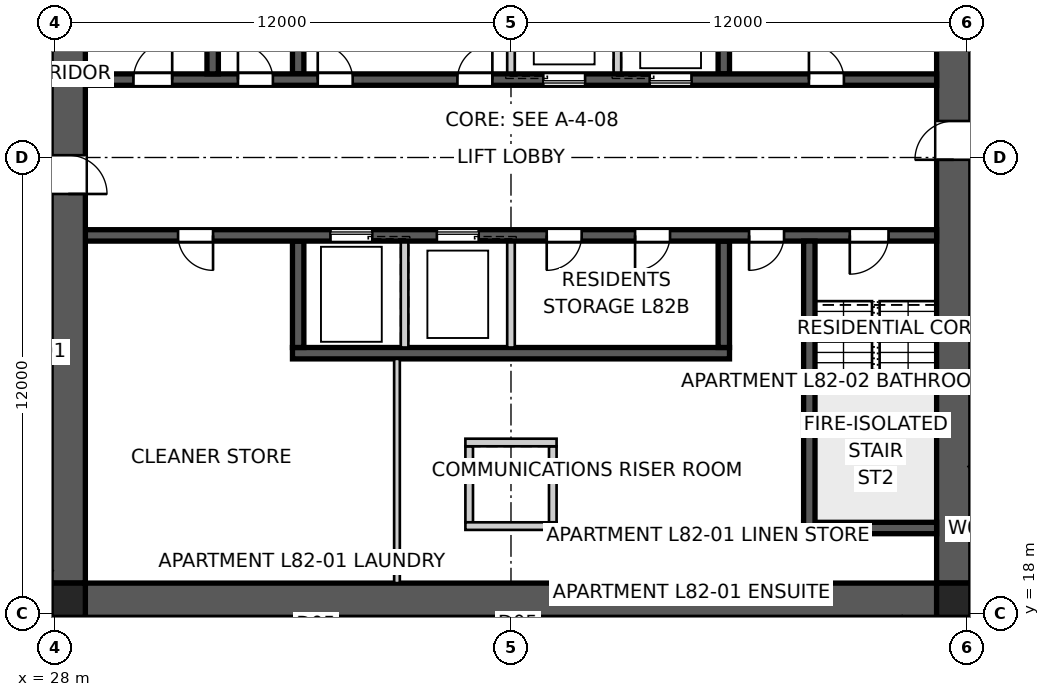
"""IFC4 building model, lengths in metres.
Left out: names, types, materials, properties, quantities, classifications, styles, units other than length and angle.
Written with IfcOpenShell. Run it as: python <this file> out.ifc"""

import sys

from ifc_helpers import new_model, si_unit, direction, frame, frame_2d, origin, origin_2d, place, context, subcontext, project, spatial, polyline, rectangle, outline, extrude, element, fill, save


model = new_model("IFC4")
c1 = context("Model", 3, precision=1e-05, world=origin(), true_north=direction((0.0, 1.0)))
c2 = subcontext(c1, "Body", "Model", "MODEL_VIEW")
j1 = project(units=[si_unit("LENGTHUNIT", "METRE"), si_unit("PLANEANGLEUNIT", "RADIAN")], contexts=[c1])
p1 = place(None, origin())
s1 = spatial("IfcSite", under=j1, at=p1, CompositionType="ELEMENT")
p2 = place(p1, origin())
s2 = spatial("IfcBuilding", under=s1, at=p2, CompositionType="ELEMENT")
p3 = place(p2, frame((0.0, 0.0, 296.4)))
s3 = spatial("IfcBuildingStorey", under=s2, at=p3, CompositionType="ELEMENT", Elevation=296.4)
p4 = place(p3, frame((51.2, 18.35, 0.0), z_axis=(0.0, 0.0, 1.0), x_axis=(-1.0, 0.0, 0.0)))
e1 = element("IfcWall", 1, at=p4, inside=s3, PredefinedType="SHEAR", context=c2, shape_type="SweptSolid", body=[
    extrude(outline(polyline([(0.0, -0.45), (22.4, -0.45), (22.4, -0.025), (22.85, -0.025), (22.85, 0.025), (22.4, 0.025), (22.4, 0.45), (0.0, 0.45), (0.0, 0.025), (-0.45, 0.025), (-0.45, -0.025), (0.0, -0.025), (0.0, -0.45)])), origin(), (0.0, 0.0, 1.0), 3.4),
])
p5 = place(p3, frame((51.65, 18.8, 0.0), z_axis=(0.0, 0.0, 1.0), x_axis=(0.0, 1.0, 0.0)))
e2 = element("IfcWall", 2, at=p5, inside=s3, PredefinedType="SHEAR", context=c2, shape_type="SweptSolid", body=[
    extrude(outline(polyline([(0.0, -0.45), (22.4, -0.45), (22.4, -0.025), (22.85, -0.025), (22.85, 0.025), (22.4, 0.025), (22.4, 0.45), (0.0, 0.45), (0.0, 0.025), (-0.45, 0.025), (-0.45, -0.025), (0.0, -0.025), (0.0, -0.45)])), origin(), (0.0, 0.0, 1.0), 3.4),
])
p6 = place(p5, frame((11.14, 0.0, 0.0)))
e3 = element("IfcOpeningElement", 3, at=p6, cuts=e2, PredefinedType="OPENING", context=c2, shape_type="SweptSolid", body=[
    extrude(rectangle(XDim=1.02, YDim=2.4, at=frame_2d((0.51, 1.2))), frame((0.0, 0.46, 0.0), z_axis=(0.0, -1.0, 0.0), x_axis=(1.0, 0.0, 0.0)), (0.0, 0.0, 1.0), 0.92),
])
p7 = place(p3, frame((28.35, 41.2, 0.0), z_axis=(0.0, 0.0, 1.0), x_axis=(0.0, -1.0, 0.0)))
e4 = element("IfcWall", 4, at=p7, inside=s3, PredefinedType="SHEAR", context=c2, shape_type="SweptSolid", body=[
    extrude(outline(polyline([(0.0, -0.45), (22.4, -0.45), (22.4, -0.025), (22.85, -0.025), (22.85, 0.025), (22.4, 0.025), (22.4, 0.45), (0.0, 0.45), (0.0, 0.025), (-0.45, 0.025), (-0.45, -0.025), (0.0, -0.025), (0.0, -0.45)])), origin(), (0.0, 0.0, 1.0), 3.4),
])
p8 = place(p7, frame((11.14, 0.0, 0.0)))
e5 = element("IfcOpeningElement", 5, at=p8, cuts=e4, PredefinedType="OPENING", context=c2, shape_type="SweptSolid", body=[
    extrude(rectangle(XDim=1.02, YDim=2.4, at=frame_2d((0.51, 1.2))), frame((0.0, 0.46, 0.0), z_axis=(0.0, -1.0, 0.0), x_axis=(1.0, 0.0, 0.0)), (0.0, 0.0, 1.0), 0.92),
])
p9 = place(p3, frame((28.8, 32.05, 0.0), z_axis=(0.0, 0.0, 1.0), x_axis=(1.0, 0.0, 0.0)))
e6 = element("IfcWall", 6, at=p9, inside=s3, PredefinedType="SHEAR", context=c2, shape_type="SweptSolid", body=[
    extrude(rectangle(XDim=22.4, YDim=0.3, at=frame_2d((11.2, 0.0))), origin(), (0.0, 0.0, 1.0), 3.4),
])
p10 = place(p9, frame((19.04, 0.0, 0.0)))
e7 = element("IfcOpeningElement", 7, at=p10, cuts=e6, PredefinedType="OPENING", context=c2, shape_type="SweptSolid", body=[
    extrude(rectangle(XDim=0.92, YDim=2.1, at=frame_2d((0.46, 1.05))), frame((0.0, 0.16, 0.0), z_axis=(0.0, -1.0, 0.0), x_axis=(1.0, 0.0, 0.0)), (0.0, 0.0, 1.0), 0.32),
])
p11 = place(p9, frame((1.265, 0.0, 0.0)))
e8 = element("IfcOpeningElement", 8, at=p11, cuts=e6, PredefinedType="OPENING", context=c2, shape_type="SweptSolid", body=[
    extrude(rectangle(XDim=1.02, YDim=2.1, at=frame_2d((0.51, 1.05))), frame((0.0, 0.16, 0.0), z_axis=(0.0, -1.0, 0.0), x_axis=(1.0, 0.0, 0.0)), (0.0, 0.0, 1.0), 0.32),
])
p12 = place(p9, frame((4.015, 0.0, 0.0)))
e9 = element("IfcOpeningElement", 9, at=p12, cuts=e6, PredefinedType="OPENING", context=c2, shape_type="SweptSolid", body=[
    extrude(rectangle(XDim=0.92, YDim=2.1, at=frame_2d((0.46, 1.05))), frame((0.0, 0.16, 0.0), z_axis=(0.0, -1.0, 0.0), x_axis=(1.0, 0.0, 0.0)), (0.0, 0.0, 1.0), 0.32),
])
p13 = place(p9, frame((6.115, 0.0, 0.0)))
e10 = element("IfcOpeningElement", 10, at=p13, cuts=e6, PredefinedType="OPENING", context=c2, shape_type="SweptSolid", body=[
    extrude(rectangle(XDim=0.92, YDim=2.1, at=frame_2d((0.46, 1.05))), frame((0.0, 0.16, 0.0), z_axis=(0.0, -1.0, 0.0), x_axis=(1.0, 0.0, 0.0)), (0.0, 0.0, 1.0), 0.32),
])
p14 = place(p9, frame((9.79, 0.0, 0.0)))
e11 = element("IfcOpeningElement", 11, at=p14, cuts=e6, PredefinedType="OPENING", context=c2, shape_type="SweptSolid", body=[
    extrude(rectangle(XDim=0.92, YDim=2.1, at=frame_2d((0.46, 1.05))), frame((0.0, 0.16, 0.0), z_axis=(0.0, -1.0, 0.0), x_axis=(1.0, 0.0, 0.0)), (0.0, 0.0, 1.0), 0.32),
])
p15 = place(p9, frame((12.05, 0.0, 0.0)))
e12 = element("IfcOpeningElement", 12, at=p15, cuts=e6, PredefinedType="OPENING", context=c2, shape_type="SweptSolid", body=[
    extrude(rectangle(XDim=1.1, YDim=2.1, at=frame_2d((0.55, 1.05))), frame((0.0, 0.16, 0.0), z_axis=(0.0, -1.0, 0.0), x_axis=(1.0, 0.0, 0.0)), (0.0, 0.0, 1.0), 0.32),
])
p16 = place(p9, frame((14.85, 0.0, 0.0)))
e13 = element("IfcOpeningElement", 13, at=p16, cuts=e6, PredefinedType="OPENING", context=c2, shape_type="SweptSolid", body=[
    extrude(rectangle(XDim=1.1, YDim=2.1, at=frame_2d((0.55, 1.05))), frame((0.0, 0.16, 0.0), z_axis=(0.0, -1.0, 0.0), x_axis=(1.0, 0.0, 0.0)), (0.0, 0.0, 1.0), 0.32),
])
p17 = place(p3, frame((51.2, 27.95, 0.0), z_axis=(0.0, 0.0, 1.0), x_axis=(-1.0, 0.0, 0.0)))
e14 = element("IfcWall", 14, at=p17, inside=s3, PredefinedType="SHEAR", context=c2, shape_type="SweptSolid", body=[
    extrude(rectangle(XDim=22.4, YDim=0.3, at=frame_2d((11.2, 0.0))), origin(), (0.0, 0.0, 1.0), 3.4),
])
p18 = place(p17, frame((19.04, 0.0, 0.0)))
e15 = element("IfcOpeningElement", 15, at=p18, cuts=e14, PredefinedType="OPENING", context=c2, shape_type="SweptSolid", body=[
    extrude(rectangle(XDim=0.92, YDim=2.1, at=frame_2d((0.46, 1.05))), frame((0.0, 0.16, 0.0), z_axis=(0.0, -1.0, 0.0), x_axis=(1.0, 0.0, 0.0)), (0.0, 0.0, 1.0), 0.32),
])
p19 = place(p17, frame((1.265, 0.0, 0.0)))
e16 = element("IfcOpeningElement", 16, at=p19, cuts=e14, PredefinedType="OPENING", context=c2, shape_type="SweptSolid", body=[
    extrude(rectangle(XDim=1.02, YDim=2.1, at=frame_2d((0.51, 1.05))), frame((0.0, 0.16, 0.0), z_axis=(0.0, -1.0, 0.0), x_axis=(1.0, 0.0, 0.0)), (0.0, 0.0, 1.0), 0.32),
])
p20 = place(p17, frame((4.015, 0.0, 0.0)))
e17 = element("IfcOpeningElement", 17, at=p20, cuts=e14, PredefinedType="OPENING", context=c2, shape_type="SweptSolid", body=[
    extrude(rectangle(XDim=0.92, YDim=2.1, at=frame_2d((0.46, 1.05))), frame((0.0, 0.16, 0.0), z_axis=(0.0, -1.0, 0.0), x_axis=(1.0, 0.0, 0.0)), (0.0, 0.0, 1.0), 0.32),
])
p21 = place(p17, frame((9.34, 0.0, 0.0)))
e18 = element("IfcOpeningElement", 18, at=p21, cuts=e14, PredefinedType="OPENING", context=c2, shape_type="SweptSolid", body=[
    extrude(rectangle(XDim=0.92, YDim=2.1, at=frame_2d((0.46, 1.05))), frame((0.0, 0.16, 0.0), z_axis=(0.0, -1.0, 0.0), x_axis=(1.0, 0.0, 0.0)), (0.0, 0.0, 1.0), 0.32),
])
p22 = place(p17, frame((7.015, 0.0, 0.0)))
e19 = element("IfcOpeningElement", 19, at=p22, cuts=e14, PredefinedType="OPENING", context=c2, shape_type="SweptSolid", body=[
    extrude(rectangle(XDim=0.92, YDim=2.1, at=frame_2d((0.46, 1.05))), frame((0.0, 0.16, 0.0), z_axis=(0.0, -1.0, 0.0), x_axis=(1.0, 0.0, 0.0)), (0.0, 0.0, 1.0), 0.32),
])
p23 = place(p17, frame((12.05, 0.0, 0.0)))
e20 = element("IfcOpeningElement", 20, at=p23, cuts=e14, PredefinedType="OPENING", context=c2, shape_type="SweptSolid", body=[
    extrude(rectangle(XDim=1.1, YDim=2.1, at=frame_2d((0.55, 1.05))), frame((0.0, 0.16, 0.0), z_axis=(0.0, -1.0, 0.0), x_axis=(1.0, 0.0, 0.0)), (0.0, 0.0, 1.0), 0.32),
])
p24 = place(p17, frame((14.85, 0.0, 0.0)))
e21 = element("IfcOpeningElement", 21, at=p24, cuts=e14, PredefinedType="OPENING", context=c2, shape_type="SweptSolid", body=[
    extrude(rectangle(XDim=1.1, YDim=2.1, at=frame_2d((0.55, 1.05))), frame((0.0, 0.16, 0.0), z_axis=(0.0, -1.0, 0.0), x_axis=(1.0, 0.0, 0.0)), (0.0, 0.0, 1.0), 0.32),
])
p25 = place(p3, frame((45.75, 24.85, 0.0), z_axis=(0.0, 0.0, 1.0), x_axis=(-1.0, 0.0, 0.0)))
e22 = element("IfcWall", 22, at=p25, inside=s3, PredefinedType="SHEAR", context=c2, shape_type="SweptSolid", body=[
    extrude(rectangle(XDim=11.5, YDim=0.3, at=frame_2d((5.75, 0.0))), origin(), (0.0, 0.0, 1.0), 3.4),
])
for number, where, z_axis, x_axis in (
    (23, (34.4, 32.2, 0.0), (0.0, 0.0, 1.0), (0.0, 1.0, 0.0)),
    (24, (45.6, 27.8, 0.0), (0.0, 0.0, 1.0), (0.0, -1.0, 0.0)),
):
    element("IfcWall", number, at=place(p3, frame(where, z_axis=z_axis, x_axis=x_axis)), inside=s3, PredefinedType="SHEAR", context=c2, shape_type="SweptSolid", body=[
        extrude(rectangle(XDim=2.8, YDim=0.3, at=frame_2d((1.4, 0.0))), origin(), (0.0, 0.0, 1.0), 3.4),
    ])
for number, where, z_axis, x_axis in (
    (25, (40.0, 32.2, 0.0), (0.0, 0.0, 1.0), (0.0, 1.0, 0.0)),
    (26, (40.0, 27.8, 0.0), (0.0, 0.0, 1.0), (0.0, -1.0, 0.0)),
    (27, (42.8, 32.2, 0.0), (0.0, 0.0, 1.0), (0.0, 1.0, 0.0)),
    (28, (37.2, 27.8, 0.0), (0.0, 0.0, 1.0), (0.0, -1.0, 0.0)),
):
    element("IfcWall", number, at=place(p3, frame(where, z_axis=z_axis, x_axis=x_axis)), inside=s3, PredefinedType="SOLIDWALL", context=c2, shape_type="SweptSolid", body=[
        extrude(rectangle(XDim=2.8, YDim=0.2, at=frame_2d((1.4, 0.0))), origin(), (0.0, 0.0, 1.0), 3.4),
    ])
for number, where, z_axis, x_axis in (
    (29, (45.6, 32.2, 0.0), (0.0, 0.0, 1.0), (0.0, 1.0, 0.0)),
    (30, (34.4, 27.8, 0.0), (0.0, 0.0, 1.0), (0.0, -1.0, 0.0)),
):
    element("IfcWall", number, at=place(p3, frame(where, z_axis=z_axis, x_axis=x_axis)), inside=s3, PredefinedType="SHEAR", context=c2, shape_type="SweptSolid", body=[
        extrude(rectangle(XDim=2.8, YDim=0.3, at=frame_2d((1.4, 0.0))), origin(), (0.0, 0.0, 1.0), 3.4),
    ])
for number, where, z_axis, x_axis in (
    (31, (32.15, 32.2, 0.0), (0.0, 0.0, 1.0), (0.0, 1.0, 0.0)),
    (32, (47.85, 27.8, 0.0), (0.0, 0.0, 1.0), (0.0, -1.0, 0.0)),
):
    element("IfcWall", number, at=place(p3, frame(where, z_axis=z_axis, x_axis=x_axis)), inside=s3, PredefinedType="SHEAR", context=c2, shape_type="SweptSolid", body=[
        extrude(rectangle(XDim=7.7, YDim=0.3, at=frame_2d((3.85, 0.0))), origin(), (0.0, 0.0, 1.0), 3.4),
    ])
p26 = place(p3, frame((51.2, 20.25, 0.0), z_axis=(0.0, 0.0, 1.0), x_axis=(-1.0, 0.0, 0.0)))
e33 = element("IfcWall", 33, at=p26, inside=s3, PredefinedType="SHEAR", context=c2, shape_type="SweptSolid", body=[
    extrude(rectangle(XDim=3.5, YDim=0.3, at=frame_2d((1.75, 0.0))), origin(), (0.0, 0.0, 1.0), 3.4),
])
for number, where, z_axis, x_axis in (
    (34, (38.9, 22.4, 0.0), (0.0, 0.0, 1.0), (0.0, -1.0, 0.0)),
    (35, (41.1, 22.4, 0.0), (0.0, 0.0, 1.0), (0.0, -1.0, 0.0)),
):
    element("IfcWall", number, at=place(p3, frame(where, z_axis=z_axis, x_axis=x_axis)), inside=s3, PredefinedType="SOLIDWALL", context=c2, shape_type="SweptSolid", body=[
        extrude(rectangle(XDim=2.0, YDim=0.2, at=frame_2d((1.0, 0.0))), origin(), (0.0, 0.0, 1.0), 3.4),
    ])
for number, where, z_axis, x_axis in (
    (36, (38.8, 22.5, 0.0), (0.0, 0.0, 1.0), (1.0, 0.0, 0.0)),
    (37, (38.8, 20.3, 0.0), (0.0, 0.0, 1.0), (1.0, 0.0, 0.0)),
):
    element("IfcWall", number, at=place(p3, frame(where, z_axis=z_axis, x_axis=x_axis)), inside=s3, PredefinedType="SOLIDWALL", context=c2, shape_type="SweptSolid", body=[
        extrude(rectangle(XDim=2.4, YDim=0.2, at=frame_2d((1.2, 0.0))), origin(), (0.0, 0.0, 1.0), 3.4),
    ])
for number, where, z_axis, x_axis in (
    (38, (28.35, 18.35, 0.0), (0.0, 0.0, 1.0), (1.0, 0.0, 0.0)),
    (39, (51.65, 18.35, 0.0), (0.0, 0.0, 1.0), (1.0, 0.0, 0.0)),
):
    element("IfcColumn", number, at=place(p3, frame(where, z_axis=z_axis, x_axis=x_axis)), inside=s3, PredefinedType="COLUMN", context=c2, shape_type="SweptSolid", body=[
        extrude(rectangle(XDim=0.9, YDim=0.9, at=origin_2d()), origin(), (0.0, 0.0, 1.0), 3.4),
    ])
p27 = place(p3, frame((53.177, 14.296, 0.0), z_axis=(0.0, 0.0, 1.0), x_axis=(-0.64279957712, 0.76603440109, 0.0)))
e40 = element("IfcWall", 40, at=p27, inside=s3, PredefinedType="PARTITIONING", context=c2, shape_type="SweptSolid", body=[
    extrude(rectangle(XDim=4.64, YDim=0.25, at=frame_2d((2.32, 0.0))), origin(), (0.0, 0.0, 1.0), 3.2),
])
p28 = place(p3, frame((37.0, 18.8, 0.0), z_axis=(0.0, 0.0, 1.0), x_axis=(0.0, 1.0, 0.0)))
e41 = element("IfcWall", 41, at=p28, inside=s3, PredefinedType="SOLIDWALL", context=c2, shape_type="SweptSolid", body=[
    extrude(rectangle(XDim=5.9, YDim=0.15, at=frame_2d((2.95, 0.0))), origin(), (0.0, 0.0, 1.0), 3.2),
])
p29 = place(p3, frame((27.9, 19.172, 0.0), z_axis=(0.0, 0.0, 1.0), x_axis=(-0.766017381482, -0.642819859111, 0.0)))
e42 = element("IfcWall", 42, at=p29, inside=s3, PredefinedType="PARTITIONING", context=c2, shape_type="SweptSolid", body=[
    extrude(rectangle(XDim=4.231, YDim=0.12, at=frame_2d((2.115, 0.0))), origin(), (0.0, 0.0, 1.0), 3.2),
])
p30 = place(p29, frame((1.676, 0.0, 0.0)))
e43 = element("IfcOpeningElement", 43, at=p30, cuts=e42, PredefinedType="OPENING", context=c2, shape_type="SweptSolid", body=[
    extrude(rectangle(XDim=0.92, YDim=2.0, at=frame_2d((0.46, 1.0))), frame((0.0, 0.07, 0.0), z_axis=(0.0, -1.0, 0.0), x_axis=(1.0, 0.0, 0.0)), (0.0, 0.0, 1.0), 0.14),
])
p31 = place(p3, frame((52.1, 21.915, 0.0), z_axis=(0.0, 0.0, 1.0), x_axis=(0.642782544614, -0.766048693191, 0.0)))
e44 = element("IfcWall", 44, at=p31, inside=s3, PredefinedType="SOLIDWALL", context=c2, shape_type="SweptSolid", body=[
    extrude(rectangle(XDim=6.489, YDim=0.15, at=frame_2d((3.244, 0.0))), origin(), (0.0, 0.0, 1.0), 3.2),
])
p32 = place(p31, frame((2.784, 0.0, 0.0)))
e45 = element("IfcOpeningElement", 45, at=p32, cuts=e44, PredefinedType="OPENING", context=c2, shape_type="SweptSolid", body=[
    extrude(rectangle(XDim=0.96, YDim=2.0, at=frame_2d((0.48, 1.0))), frame((0.0, 0.085, 0.0), z_axis=(0.0, -1.0, 0.0), x_axis=(1.0, 0.0, 0.0)), (0.0, 0.0, 1.0), 0.17),
])
p33 = place(p10, origin())
e46 = element("IfcDoor", 46, at=p33, inside=s3, OperationType="SINGLE_SWING_LEFT", PredefinedType="DOOR", context=c2, shape_type="SweptSolid", body=[
    extrude(rectangle(XDim=0.92, YDim=2.1, at=frame_2d((0.46, 1.05))), frame((0.0, 0.025, 0.0), z_axis=(0.0, -1.0, 0.0), x_axis=(1.0, 0.0, 0.0)), (0.0, 0.0, 1.0), 0.05),
])
fill(e7, e46)
p34 = place(p18, origin())
e47 = element("IfcDoor", 47, at=p34, inside=s3, OperationType="SINGLE_SWING_LEFT", PredefinedType="DOOR", context=c2, shape_type="SweptSolid", body=[
    extrude(rectangle(XDim=0.92, YDim=2.1, at=frame_2d((0.46, 1.05))), frame((0.0, 0.025, 0.0), z_axis=(0.0, -1.0, 0.0), x_axis=(1.0, 0.0, 0.0)), (0.0, 0.0, 1.0), 0.05),
])
fill(e15, e47)
p35 = place(p19, origin())
e48 = element("IfcDoor", 48, at=p35, inside=s3, OperationType="SINGLE_SWING_RIGHT", PredefinedType="DOOR", context=c2, shape_type="SweptSolid", body=[
    extrude(rectangle(XDim=1.02, YDim=2.1, at=frame_2d((0.51, 1.05))), frame((0.0, 0.025, 0.0), z_axis=(0.0, -1.0, 0.0), x_axis=(1.0, 0.0, 0.0)), (0.0, 0.0, 1.0), 0.05),
])
fill(e16, e48)
p36 = place(p11, origin())
e49 = element("IfcDoor", 49, at=p36, inside=s3, OperationType="SINGLE_SWING_RIGHT", PredefinedType="DOOR", context=c2, shape_type="SweptSolid", body=[
    extrude(rectangle(XDim=1.02, YDim=2.1, at=frame_2d((0.51, 1.05))), frame((0.0, 0.025, 0.0), z_axis=(0.0, -1.0, 0.0), x_axis=(1.0, 0.0, 0.0)), (0.0, 0.0, 1.0), 0.05),
])
fill(e8, e49)
p37 = place(p12, origin())
e50 = element("IfcDoor", 50, at=p37, inside=s3, OperationType="SINGLE_SWING_LEFT", PredefinedType="DOOR", context=c2, shape_type="SweptSolid", body=[
    extrude(rectangle(XDim=0.92, YDim=2.1, at=frame_2d((0.46, 1.05))), frame((0.0, 0.025, 0.0), z_axis=(0.0, -1.0, 0.0), x_axis=(1.0, 0.0, 0.0)), (0.0, 0.0, 1.0), 0.05),
])
fill(e9, e50)
p38 = place(p20, origin())
e51 = element("IfcDoor", 51, at=p38, inside=s3, OperationType="SINGLE_SWING_RIGHT", PredefinedType="DOOR", context=c2, shape_type="SweptSolid", body=[
    extrude(rectangle(XDim=0.92, YDim=2.1, at=frame_2d((0.46, 1.05))), frame((0.0, 0.025, 0.0), z_axis=(0.0, -1.0, 0.0), x_axis=(1.0, 0.0, 0.0)), (0.0, 0.0, 1.0), 0.05),
])
fill(e17, e51)
p39 = place(p13, origin())
e52 = element("IfcDoor", 52, at=p39, inside=s3, OperationType="SINGLE_SWING_LEFT", PredefinedType="DOOR", context=c2, shape_type="SweptSolid", body=[
    extrude(rectangle(XDim=0.92, YDim=2.1, at=frame_2d((0.46, 1.05))), frame((0.0, 0.025, 0.0), z_axis=(0.0, -1.0, 0.0), x_axis=(1.0, 0.0, 0.0)), (0.0, 0.0, 1.0), 0.05),
])
fill(e10, e52)
p40 = place(p14, origin())
e53 = element("IfcDoor", 53, at=p40, inside=s3, OperationType="SINGLE_SWING_RIGHT", PredefinedType="DOOR", context=c2, shape_type="SweptSolid", body=[
    extrude(rectangle(XDim=0.92, YDim=2.1, at=frame_2d((0.46, 1.05))), frame((0.0, 0.025, 0.0), z_axis=(0.0, -1.0, 0.0), x_axis=(1.0, 0.0, 0.0)), (0.0, 0.0, 1.0), 0.05),
])
fill(e11, e53)
p41 = place(p21, origin())
e54 = element("IfcDoor", 54, at=p41, inside=s3, OperationType="SINGLE_SWING_RIGHT", PredefinedType="DOOR", context=c2, shape_type="SweptSolid", body=[
    extrude(rectangle(XDim=0.92, YDim=2.1, at=frame_2d((0.46, 1.05))), frame((0.0, 0.025, 0.0), z_axis=(0.0, -1.0, 0.0), x_axis=(1.0, 0.0, 0.0)), (0.0, 0.0, 1.0), 0.05),
])
fill(e18, e54)
p42 = place(p22, origin())
e55 = element("IfcDoor", 55, at=p42, inside=s3, OperationType="SINGLE_SWING_RIGHT", PredefinedType="DOOR", context=c2, shape_type="SweptSolid", body=[
    extrude(rectangle(XDim=0.92, YDim=2.1, at=frame_2d((0.46, 1.05))), frame((0.0, 0.025, 0.0), z_axis=(0.0, -1.0, 0.0), x_axis=(1.0, 0.0, 0.0)), (0.0, 0.0, 1.0), 0.05),
])
fill(e19, e55)
p43 = place(p6, origin())
e56 = element("IfcDoor", 56, at=p43, inside=s3, OperationType="SINGLE_SWING_LEFT", PredefinedType="DOOR", context=c2, shape_type="SweptSolid", body=[
    extrude(rectangle(XDim=1.02, YDim=2.4, at=frame_2d((0.51, 1.2))), frame((0.0, 0.025, 0.0), z_axis=(0.0, -1.0, 0.0), x_axis=(1.0, 0.0, 0.0)), (0.0, 0.0, 1.0), 0.05),
])
fill(e3, e56)
p44 = place(p8, origin())
e57 = element("IfcDoor", 57, at=p44, inside=s3, OperationType="SINGLE_SWING_RIGHT", PredefinedType="DOOR", context=c2, shape_type="SweptSolid", body=[
    extrude(rectangle(XDim=1.02, YDim=2.4, at=frame_2d((0.51, 1.2))), frame((0.0, 0.025, 0.0), z_axis=(0.0, -1.0, 0.0), x_axis=(1.0, 0.0, 0.0)), (0.0, 0.0, 1.0), 0.05),
])
fill(e5, e57)
p45 = place(p15, origin())
e58 = element("IfcDoor", 58, at=p45, inside=s3, OperationType="SLIDING_TO_LEFT", PredefinedType="DOOR", context=c2, shape_type="SweptSolid", body=[
    extrude(rectangle(XDim=1.1, YDim=2.1, at=frame_2d((0.55, 1.05))), frame((0.0, 0.025, 0.0), z_axis=(0.0, -1.0, 0.0), x_axis=(1.0, 0.0, 0.0)), (0.0, 0.0, 1.0), 0.05),
])
fill(e12, e58)
p46 = place(p23, origin())
e59 = element("IfcDoor", 59, at=p46, inside=s3, OperationType="SLIDING_TO_LEFT", PredefinedType="DOOR", context=c2, shape_type="SweptSolid", body=[
    extrude(rectangle(XDim=1.1, YDim=2.1, at=frame_2d((0.55, 1.05))), frame((0.0, 0.025, 0.0), z_axis=(0.0, -1.0, 0.0), x_axis=(1.0, 0.0, 0.0)), (0.0, 0.0, 1.0), 0.05),
])
fill(e20, e59)
p47 = place(p16, origin())
e60 = element("IfcDoor", 60, at=p47, inside=s3, OperationType="SLIDING_TO_LEFT", PredefinedType="DOOR", context=c2, shape_type="SweptSolid", body=[
    extrude(rectangle(XDim=1.1, YDim=2.1, at=frame_2d((0.55, 1.05))), frame((0.0, 0.025, 0.0), z_axis=(0.0, -1.0, 0.0), x_axis=(1.0, 0.0, 0.0)), (0.0, 0.0, 1.0), 0.05),
])
fill(e13, e60)
p48 = place(p24, origin())
e61 = element("IfcDoor", 61, at=p48, inside=s3, OperationType="SLIDING_TO_LEFT", PredefinedType="DOOR", context=c2, shape_type="SweptSolid", body=[
    extrude(rectangle(XDim=1.1, YDim=2.1, at=frame_2d((0.55, 1.05))), frame((0.0, 0.025, 0.0), z_axis=(0.0, -1.0, 0.0), x_axis=(1.0, 0.0, 0.0)), (0.0, 0.0, 1.0), 0.05),
])
fill(e21, e61)
save(model, sys.argv[1])
